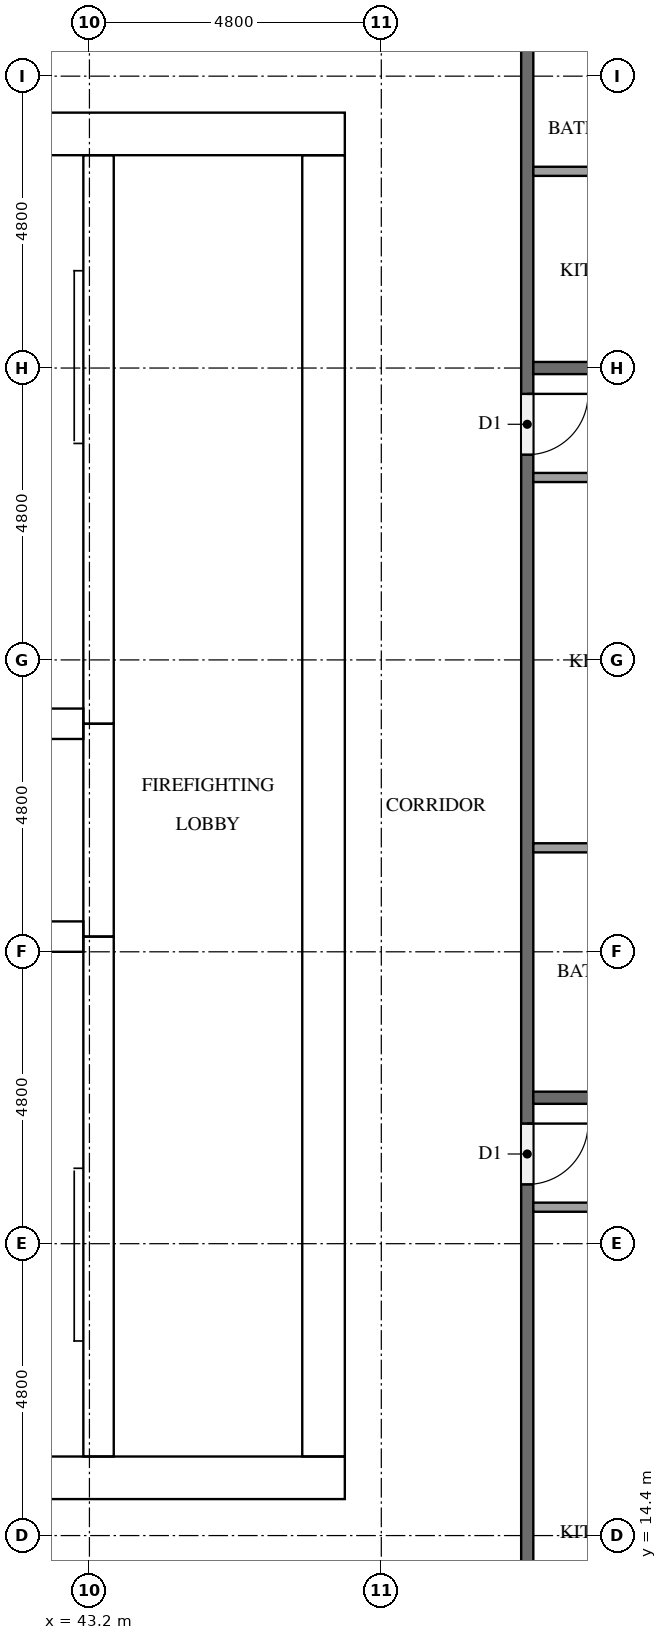
"""IFC4 building model, lengths in metres.
Left out: names, types, materials, properties, quantities, classifications, styles, units other than length and angle.
Written with IfcOpenShell. Run it as: python <this file> out.ifc"""

import sys

from ifc_helpers import new_model, si_unit, direction, frame, frame_2d, origin, place, context, subcontext, project, spatial, rectangle, extrude, element, fill, save


model = new_model("IFC4")
c1 = context("Model", 3, precision=1e-05, world=origin(), true_north=direction((0.0, 1.0)))
c2 = subcontext(c1, "Body", "Model", "MODEL_VIEW")
j1 = project(units=[si_unit("LENGTHUNIT", "METRE"), si_unit("PLANEANGLEUNIT", "RADIAN")], contexts=[c1])
p1 = place(None, origin())
s1 = spatial("IfcSite", under=j1, at=p1, CompositionType="ELEMENT")
p2 = place(p1, origin())
s2 = spatial("IfcBuilding", under=s1, at=p2, CompositionType="ELEMENT")
p3 = place(p2, frame((0.0, 0.0, 215.8)))
s3 = spatial("IfcBuildingStorey", under=s2, at=p3, CompositionType="ELEMENT", Elevation=215.8)
p4 = place(p3, frame((15.0, 15.35, 0.0), z_axis=(0.0, 0.0, 1.0), x_axis=(1.0, 0.0, 0.0)))
e1 = element("IfcWall", 1, at=p4, inside=s3, PredefinedType="SHEAR", context=c2, shape_type="SweptSolid", body=[
    extrude(rectangle(XDim=32.4, YDim=0.7, at=frame_2d((16.2, 0.0))), origin(), (0.0, 0.0, 1.0), 3.2),
])
p5 = place(p4, frame((15.3, 0.0, 0.0)))
e2 = element("IfcOpeningElement", 2, at=p5, cuts=e1, PredefinedType="OPENING", context=c2, shape_type="SweptSolid", body=[
    extrude(rectangle(XDim=1.8, YDim=2.1, at=frame_2d((0.9, 1.05))), frame((0.0, 0.36, 0.0), z_axis=(0.0, -1.0, 0.0), x_axis=(1.0, 0.0, 0.0)), (0.0, 0.0, 1.0), 0.72),
])
p6 = place(p3, frame((15.0, 37.45, 0.0), z_axis=(0.0, 0.0, 1.0), x_axis=(1.0, 0.0, 0.0)))
e3 = element("IfcWall", 3, at=p6, inside=s3, PredefinedType="SHEAR", context=c2, shape_type="SweptSolid", body=[
    extrude(rectangle(XDim=32.4, YDim=0.7, at=frame_2d((16.2, 0.0))), origin(), (0.0, 0.0, 1.0), 3.2),
])
p7 = place(p6, frame((15.3, 0.0, 0.0)))
e4 = element("IfcOpeningElement", 4, at=p7, cuts=e3, PredefinedType="OPENING", context=c2, shape_type="SweptSolid", body=[
    extrude(rectangle(XDim=1.8, YDim=2.1, at=frame_2d((0.9, 1.05))), frame((0.0, 0.36, 0.0), z_axis=(0.0, -1.0, 0.0), x_axis=(1.0, 0.0, 0.0)), (0.0, 0.0, 1.0), 0.72),
])
p8 = place(p6, frame((1.544, 0.0, 0.0)))
e5 = element("IfcOpeningElement", 5, at=p8, cuts=e3, PredefinedType="OPENING", context=c2, shape_type="SweptSolid", body=[
    extrude(rectangle(XDim=1.0, YDim=2.1, at=frame_2d((0.5, 1.05))), frame((0.0, 0.36, 0.0), z_axis=(0.0, -1.0, 0.0), x_axis=(1.0, 0.0, 0.0)), (0.0, 0.0, 1.0), 0.72),
])
p9 = place(p6, frame((5.219, 0.0, 0.0)))
e6 = element("IfcOpeningElement", 6, at=p9, cuts=e3, PredefinedType="OPENING", context=c2, shape_type="SweptSolid", body=[
    extrude(rectangle(XDim=1.0, YDim=2.1, at=frame_2d((0.5, 1.05))), frame((0.0, 0.36, 0.0), z_axis=(0.0, -1.0, 0.0), x_axis=(1.0, 0.0, 0.0)), (0.0, 0.0, 1.0), 0.72),
])
p10 = place(p3, frame((47.05, 15.7, 0.0), z_axis=(0.0, 0.0, 1.0), x_axis=(0.0, 1.0, 0.0)))
e7 = element("IfcWall", 7, at=p10, inside=s3, PredefinedType="SHEAR", context=c2, shape_type="SweptSolid", body=[
    extrude(rectangle(XDim=21.4, YDim=0.7, at=frame_2d((10.7, 0.0))), origin(), (0.0, 0.0, 1.0), 3.2),
])
p11 = place(p10, frame((10.4, 0.0, 0.0)))
e8 = element("IfcOpeningElement", 8, at=p11, cuts=e7, PredefinedType="OPENING", context=c2, shape_type="SweptSolid", body=[
    extrude(rectangle(XDim=1.2, YDim=2.1, at=frame_2d((0.6, 1.05))), frame((0.0, 0.36, 0.0), z_axis=(0.0, -1.0, 0.0), x_axis=(1.0, 0.0, 0.0)), (0.0, 0.0, 1.0), 0.72),
])
p12 = place(p3, frame((43.35, 15.7, 0.0), z_axis=(0.0, 0.0, 1.0), x_axis=(0.0, 1.0, 0.0)))
e9 = element("IfcWall", 9, at=p12, inside=s3, PredefinedType="SHEAR", context=c2, shape_type="SweptSolid", body=[
    extrude(rectangle(XDim=8.55, YDim=0.5, at=frame_2d((4.275, 0.0))), origin(), (0.0, 0.0, 1.0), 3.2),
])
p13 = place(p12, frame((0.5, 0.0, 0.0)))
e10 = element("IfcOpeningElement", 10, at=p13, cuts=e9, PredefinedType="OPENING", context=c2, shape_type="SweptSolid", body=[
    extrude(rectangle(XDim=1.2, YDim=2.1, at=frame_2d((0.6, 1.05))), frame((0.0, 0.26, 0.0), z_axis=(0.0, -1.0, 0.0), x_axis=(1.0, 0.0, 0.0)), (0.0, 0.0, 1.0), 0.52),
])
p14 = place(p3, frame((43.35, 24.25, 0.0), z_axis=(0.0, 0.0, 1.0), x_axis=(0.0, 1.0, 0.0)))
e11 = element("IfcWall", 11, at=p14, inside=s3, PredefinedType="SHEAR", context=c2, shape_type="SweptSolid", body=[
    extrude(rectangle(XDim=3.5, YDim=0.5, at=frame_2d((1.75, 0.0))), origin(), (0.0, 0.0, 1.0), 3.2),
])
p15 = place(p14, frame((1.2, 0.0, 0.0)))
e12 = element("IfcOpeningElement", 12, at=p15, cuts=e11, PredefinedType="OPENING", context=c2, shape_type="SweptSolid", body=[
    extrude(rectangle(XDim=1.1, YDim=2.1, at=frame_2d((0.55, 1.05))), frame((0.0, 0.26, 0.0), z_axis=(0.0, -1.0, 0.0), x_axis=(1.0, 0.0, 0.0)), (0.0, 0.0, 1.0), 0.52),
])
p16 = place(p3, frame((43.35, 27.75, 0.0), z_axis=(0.0, 0.0, 1.0), x_axis=(0.0, 1.0, 0.0)))
e13 = element("IfcWall", 13, at=p16, inside=s3, PredefinedType="SHEAR", context=c2, shape_type="SweptSolid", body=[
    extrude(rectangle(XDim=9.35, YDim=0.5, at=frame_2d((4.675, 0.0))), origin(), (0.0, 0.0, 1.0), 3.2),
])
p17 = place(p16, frame((7.65, 0.0, 0.0)))
e14 = element("IfcOpeningElement", 14, at=p17, cuts=e13, PredefinedType="OPENING", context=c2, shape_type="SweptSolid", body=[
    extrude(rectangle(XDim=1.2, YDim=2.1, at=frame_2d((0.6, 1.05))), frame((0.0, 0.26, 0.0), z_axis=(0.0, -1.0, 0.0), x_axis=(1.0, 0.0, 0.0)), (0.0, 0.0, 1.0), 0.52),
])
for number, where, z_axis, x_axis in (
    (15, (39.55, 24.25, 0.0), (0.0, 0.0, 1.0), (1.0, 0.0, 0.0)),
    (16, (39.55, 27.75, 0.0), (0.0, 0.0, 1.0), (1.0, 0.0, 0.0)),
):
    element("IfcWall", number, at=place(p3, frame(where, z_axis=z_axis, x_axis=x_axis)), inside=s3, PredefinedType="SHEAR", context=c2, shape_type="SweptSolid", body=[
        extrude(rectangle(XDim=3.55, YDim=0.5, at=frame_2d((1.775, 0.0))), origin(), (0.0, 0.0, 1.0), 3.2),
    ])
p18 = place(p3, frame((50.4, 40.7, 0.0), z_axis=(0.0, 0.0, 1.0), x_axis=(0.0, -1.0, 0.0)))
e17 = element("IfcWall", 17, at=p18, inside=s3, PredefinedType="PARTITIONING", context=c2, shape_type="SweptSolid", body=[
    extrude(rectangle(XDim=28.6, YDim=0.2, at=frame_2d((14.3, 0.0))), origin(), (0.0, 0.0, 1.0), 3.2),
])
p19 = place(p18, frame((19.525, 0.0, 0.0)))
e18 = element("IfcOpeningElement", 18, at=p19, cuts=e17, PredefinedType="OPENING", context=c2, shape_type="SweptSolid", body=[
    extrude(rectangle(XDim=1.0, YDim=2.1, at=frame_2d((0.5, 1.05))), frame((0.0, 0.11, 0.0), z_axis=(0.0, -1.0, 0.0), x_axis=(1.0, 0.0, 0.0)), (0.0, 0.0, 1.0), 0.22),
])
p20 = place(p18, frame((7.525, 0.0, 0.0)))
e19 = element("IfcOpeningElement", 19, at=p20, cuts=e17, PredefinedType="OPENING", context=c2, shape_type="SweptSolid", body=[
    extrude(rectangle(XDim=1.0, YDim=2.1, at=frame_2d((0.5, 1.05))), frame((0.0, 0.11, 0.0), z_axis=(0.0, -1.0, 0.0), x_axis=(1.0, 0.0, 0.0)), (0.0, 0.0, 1.0), 0.22),
])
p21 = place(p18, frame((0.325, 0.0, 0.0)))
e20 = element("IfcOpeningElement", 20, at=p21, cuts=e17, PredefinedType="OPENING", context=c2, shape_type="SweptSolid", body=[
    extrude(rectangle(XDim=1.0, YDim=2.1, at=frame_2d((0.5, 1.05))), frame((0.0, 0.11, 0.0), z_axis=(0.0, -1.0, 0.0), x_axis=(1.0, 0.0, 0.0)), (0.0, 0.0, 1.0), 0.22),
])
for number, where, z_axis, x_axis in (
    (21, (50.5, 21.6, 0.0), (0.0, 0.0, 1.0), (1.0, 0.0, 0.0)),
    (22, (50.5, 33.6, 0.0), (0.0, 0.0, 1.0), (1.0, 0.0, 0.0)),
):
    element("IfcWall", number, at=place(p3, frame(where, z_axis=z_axis, x_axis=x_axis)), inside=s3, PredefinedType="PARTITIONING", context=c2, shape_type="SweptSolid", body=[
        extrude(rectangle(XDim=11.8, YDim=0.2, at=frame_2d((5.9, 0.0))), origin(), (0.0, 0.0, 1.0), 3.2),
    ])
p22 = place(p3, frame((50.5, 19.8, 0.0), z_axis=(0.0, 0.0, 1.0), x_axis=(1.0, 0.0, 0.0)))
e23 = element("IfcWall", 23, at=p22, inside=s3, PredefinedType="PARTITIONING", context=c2, shape_type="SweptSolid", body=[
    extrude(rectangle(XDim=3.125, YDim=0.15, at=frame_2d((1.562, 0.0))), origin(), (0.0, 0.0, 1.0), 3.2),
])
p23 = place(p3, frame((50.5, 25.71, 0.0), z_axis=(0.0, 0.0, 1.0), x_axis=(1.0, 0.0, 0.0)))
e24 = element("IfcWall", 24, at=p23, inside=s3, PredefinedType="PARTITIONING", context=c2, shape_type="SweptSolid", body=[
    extrude(rectangle(XDim=3.275, YDim=0.15, at=frame_2d((1.637, 0.0))), origin(), (0.0, 0.0, 1.0), 3.2),
])
p24 = place(p3, frame((50.5, 31.8, 0.0), z_axis=(0.0, 0.0, 1.0), x_axis=(1.0, 0.0, 0.0)))
e25 = element("IfcWall", 25, at=p24, inside=s3, PredefinedType="PARTITIONING", context=c2, shape_type="SweptSolid", body=[
    extrude(rectangle(XDim=3.425, YDim=0.15, at=frame_2d((1.712, 0.0))), origin(), (0.0, 0.0, 1.0), 3.2),
])
p25 = place(p3, frame((50.5, 36.835, 0.0), z_axis=(0.0, 0.0, 1.0), x_axis=(1.0, 0.0, 0.0)))
e26 = element("IfcWall", 26, at=p25, inside=s3, PredefinedType="PARTITIONING", context=c2, shape_type="SweptSolid", body=[
    extrude(rectangle(XDim=2.975, YDim=0.15, at=frame_2d((1.488, 0.0))), origin(), (0.0, 0.0, 1.0), 3.2),
])
p26 = place(p15, origin())
e27 = element("IfcDoor", 27, at=p26, inside=s3, OperationType="DOUBLE_DOOR_SLIDING", PredefinedType="DOOR", context=c2, shape_type="SweptSolid", body=[
    extrude(rectangle(XDim=1.1, YDim=2.1, at=frame_2d((0.55, 1.05))), frame((0.0, 0.025, 0.0), z_axis=(0.0, -1.0, 0.0), x_axis=(1.0, 0.0, 0.0)), (0.0, 0.0, 1.0), 0.05),
])
fill(e12, e27)
p27 = place(p13, origin())
e28 = element("IfcDoor", 28, at=p27, inside=s3, OperationType="SINGLE_SWING_LEFT", PredefinedType="DOOR", context=c2, shape_type="SweptSolid", body=[
    extrude(rectangle(XDim=1.2, YDim=2.1, at=frame_2d((0.6, 1.05))), frame((0.0, 0.025, 0.0), z_axis=(0.0, -1.0, 0.0), x_axis=(1.0, 0.0, 0.0)), (0.0, 0.0, 1.0), 0.05),
])
fill(e10, e28)
p28 = place(p17, origin())
e29 = element("IfcDoor", 29, at=p28, inside=s3, OperationType="SINGLE_SWING_RIGHT", PredefinedType="DOOR", context=c2, shape_type="SweptSolid", body=[
    extrude(rectangle(XDim=1.2, YDim=2.1, at=frame_2d((0.6, 1.05))), frame((0.0, 0.025, 0.0), z_axis=(0.0, -1.0, 0.0), x_axis=(1.0, 0.0, 0.0)), (0.0, 0.0, 1.0), 0.05),
])
fill(e14, e29)
p29 = place(p11, origin())
e30 = element("IfcDoor", 30, at=p29, inside=s3, OperationType="SINGLE_SWING_RIGHT", PredefinedType="DOOR", context=c2, shape_type="SweptSolid", body=[
    extrude(rectangle(XDim=1.2, YDim=2.1, at=frame_2d((0.6, 1.05))), frame((0.0, 0.025, 0.0), z_axis=(0.0, -1.0, 0.0), x_axis=(1.0, 0.0, 0.0)), (0.0, 0.0, 1.0), 0.05),
])
fill(e8, e30)
p30 = place(p19, origin())
e31 = element("IfcDoor", 31, at=p30, inside=s3, OperationType="SINGLE_SWING_LEFT", PredefinedType="DOOR", context=c2, shape_type="SweptSolid", body=[
    extrude(rectangle(XDim=1.0, YDim=2.1, at=frame_2d((0.5, 1.05))), frame((0.0, 0.025, 0.0), z_axis=(0.0, -1.0, 0.0), x_axis=(1.0, 0.0, 0.0)), (0.0, 0.0, 1.0), 0.05),
])
fill(e18, e31)
p31 = place(p20, origin())
e32 = element("IfcDoor", 32, at=p31, inside=s3, OperationType="SINGLE_SWING_LEFT", PredefinedType="DOOR", context=c2, shape_type="SweptSolid", body=[
    extrude(rectangle(XDim=1.0, YDim=2.1, at=frame_2d((0.5, 1.05))), frame((0.0, 0.025, 0.0), z_axis=(0.0, -1.0, 0.0), x_axis=(1.0, 0.0, 0.0)), (0.0, 0.0, 1.0), 0.05),
])
fill(e19, e32)
save(model, sys.argv[1])
